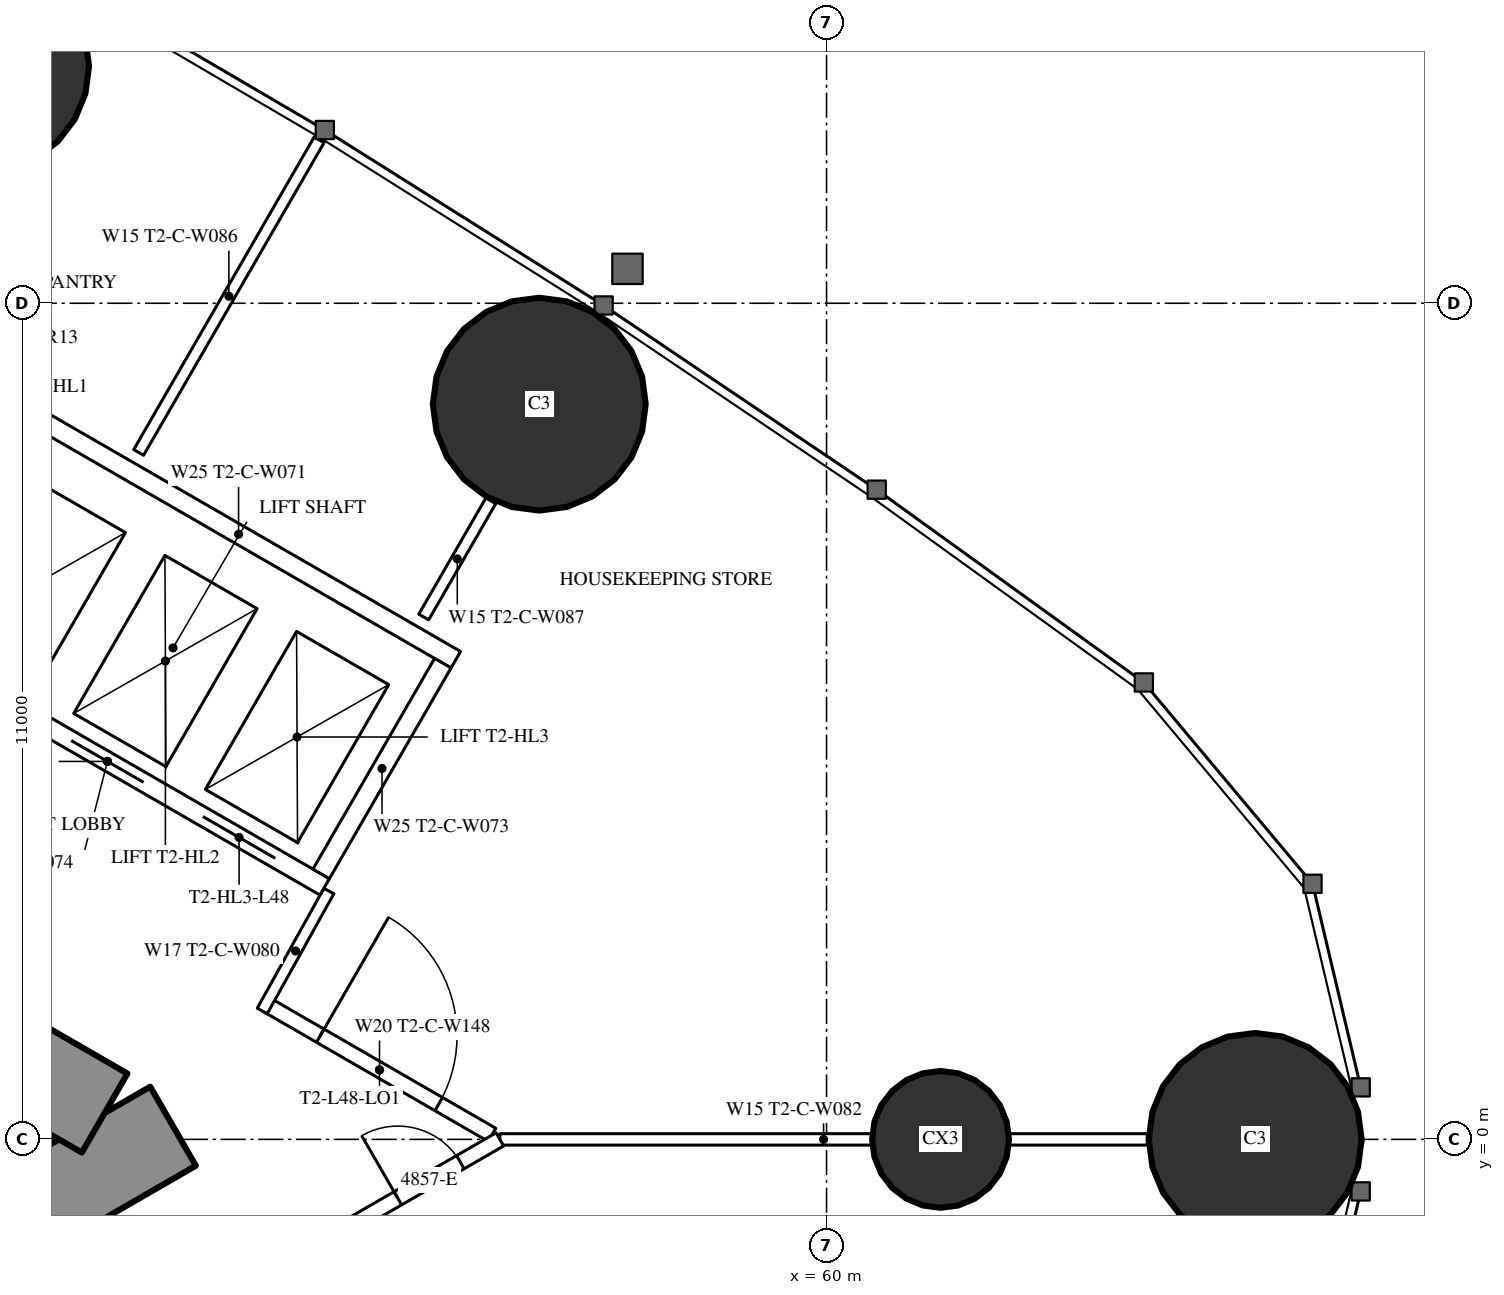
"""IFC4 building model, lengths in metres.
Left out: names, types, materials, properties, quantities, classifications, styles, units other than length and angle.
Written with IfcOpenShell. Run it as: python <this file> out.ifc"""

import sys

from ifc_helpers import new_model, si_unit, direction, frame, frame_2d, origin, origin_2d, place, context, subcontext, project, spatial, rectangle, circle, extrude, element, fill, save


model = new_model("IFC4")
c1 = context("Model", 3, precision=1e-05, world=origin(), true_north=direction((0.0, 1.0)))
c2 = subcontext(c1, "Body", "Model", "MODEL_VIEW")
j1 = project(units=[si_unit("LENGTHUNIT", "METRE"), si_unit("PLANEANGLEUNIT", "RADIAN")], contexts=[c1])
p1 = place(None, origin())
s1 = spatial("IfcSite", under=j1, at=p1, CompositionType="ELEMENT")
p2 = place(p1, origin())
s2 = spatial("IfcBuilding", under=s1, at=p2, CompositionType="ELEMENT")
p3 = place(p2, frame((0.0, 0.0, 180.8)))
s3 = spatial("IfcBuildingStorey", under=s2, at=p3, CompositionType="ELEMENT", Elevation=180.8)
for number, where, z_axis, x_axis in (
    (1, (65.64, 0.0, 0.0), (0.0, 0.0, 1.0), (1.0, 0.0, 0.0)),
    (2, (56.221, 9.672, 0.0), (0.0, 0.0, 1.0), (1.0, 0.0, 0.0)),
    (3, (48.897, 14.121, 0.0), (0.0, 0.0, 1.0), (1.0, 0.0, 0.0)),
):
    element("IfcColumn", number, at=place(p3, frame(where, z_axis=z_axis, x_axis=x_axis)), inside=s3, PredefinedType="COLUMN", context=c2, shape_type="SweptSolid", body=[
        extrude(circle(Radius=1.4, at=origin_2d()), origin(), (0.0, 0.0, 1.0), 3.5),
    ])
p4 = place(p3, frame((61.5, 0.0, 0.0), z_axis=(0.0, 0.0, 1.0), x_axis=(1.0, 0.0, 0.0)))
e4 = element("IfcColumn", 4, at=p4, inside=s3, PredefinedType="COLUMN", context=c2, shape_type="SweptSolid", body=[
    extrude(circle(Radius=0.9, at=origin_2d()), origin(), (0.0, 0.0, 1.0), 3.5),
])
p5 = place(p3, frame((27.2, -13.8, 0.0), z_axis=(0.0, 0.0, 1.0), x_axis=(0.866027159892, 0.499996958321, 0.0)))
e5 = element("IfcWall", 5, at=p5, inside=s3, PredefinedType="SHEAR", context=c2, shape_type="SweptSolid", body=[
    extrude(rectangle(XDim=27.947, YDim=1.2, at=frame_2d((13.973, 0.0))), origin(), (0.0, 0.0, 1.0), 3.5),
])
p6 = place(p5, frame((4.6, 0.0, 0.0)))
e6 = element("IfcOpeningElement", 6, at=p6, cuts=e5, PredefinedType="OPENING", context=c2, shape_type="SweptSolid", body=[
    extrude(rectangle(XDim=1.0, YDim=2.2, at=frame_2d((0.5, 1.1))), frame((0.0, 0.61, 0.0), z_axis=(0.0, -1.0, 0.0), x_axis=(1.0, 0.0, 0.0)), (0.0, 0.0, 1.0), 1.22),
])
p7 = place(p5, frame((13.395, 0.0, 0.0)))
e7 = element("IfcOpeningElement", 7, at=p7, cuts=e5, PredefinedType="OPENING", context=c2, shape_type="SweptSolid", body=[
    extrude(rectangle(XDim=1.8, YDim=2.2, at=frame_2d((0.9, 1.1))), frame((0.0, 0.61, 0.0), z_axis=(0.0, -1.0, 0.0), x_axis=(1.0, 0.0, 0.0)), (0.0, 0.0, 1.0), 1.22),
])
p8 = place(p3, frame((27.2, 13.8, 0.0), z_axis=(0.0, 0.0, 1.0), x_axis=(0.866024515034, -0.500001539357, 0.0)))
e8 = element("IfcWall", 8, at=p8, inside=s3, PredefinedType="SHEAR", context=c2, shape_type="SweptSolid", body=[
    extrude(rectangle(XDim=26.907, YDim=1.2, at=frame_2d((13.454, 0.0))), origin(), (0.0, 0.0, 1.0), 3.5),
])
p9 = place(p8, frame((4.6, 0.0, 0.0)))
e9 = element("IfcOpeningElement", 9, at=p9, cuts=e8, PredefinedType="OPENING", context=c2, shape_type="SweptSolid", body=[
    extrude(rectangle(XDim=1.0, YDim=2.2, at=frame_2d((0.5, 1.1))), frame((0.0, 0.61, 0.0), z_axis=(0.0, -1.0, 0.0), x_axis=(1.0, 0.0, 0.0)), (0.0, 0.0, 1.0), 1.22),
])
p10 = place(p8, frame((13.395, 0.0, 0.0)))
e10 = element("IfcOpeningElement", 10, at=p10, cuts=e8, PredefinedType="OPENING", context=c2, shape_type="SweptSolid", body=[
    extrude(rectangle(XDim=1.8, YDim=2.2, at=frame_2d((0.9, 1.1))), frame((0.0, 0.61, 0.0), z_axis=(0.0, -1.0, 0.0), x_axis=(1.0, 0.0, 0.0)), (0.0, 0.0, 1.0), 1.22),
])
p11 = place(p3, frame((55.702, 0.0, 0.0), z_axis=(0.0, 0.0, 1.0), x_axis=(1.0, 0.0, 0.0)))
e11 = element("IfcWall", 11, at=p11, inside=s3, PredefinedType="PARTITIONING", context=c2, shape_type="SweptSolid", body=[
    extrude(rectangle(XDim=8.518, YDim=0.15, at=frame_2d((4.259, 0.0))), origin(), (0.0, 0.0, 1.0), 2.3),
])
p12 = place(p3, frame((50.95, 9.037, 0.0), z_axis=(0.0, 0.0, 1.0), x_axis=(0.499988022762, 0.866032318735, 0.0)))
e12 = element("IfcWall", 12, at=p12, inside=s3, PredefinedType="PARTITIONING", context=c2, shape_type="SweptSolid", body=[
    extrude(rectangle(XDim=4.748, YDim=0.15, at=frame_2d((2.374, 0.0))), origin(), (0.0, 0.0, 1.0), 3.25),
])
p13 = place(p3, frame((54.7, 6.872, 0.0), z_axis=(0.0, 0.0, 1.0), x_axis=(0.499989690894, 0.866031355668, 0.0)))
e13 = element("IfcWall", 13, at=p13, inside=s3, PredefinedType="PARTITIONING", context=c2, shape_type="SweptSolid", body=[
    extrude(rectangle(XDim=1.766, YDim=0.15, at=frame_2d((0.883, 0.0))), origin(), (0.0, 0.0, 1.0), 3.25),
])
p14 = place(p3, frame((52.639, 1.769, 0.0), z_axis=(0.0, 0.0, 1.0), x_axis=(0.866027340901, -0.4999966448, 0.0)))
e14 = element("IfcWall", 14, at=p14, inside=s3, PredefinedType="PARTITIONING", context=c2, shape_type="SweptSolid", body=[
    extrude(rectangle(XDim=3.417, YDim=0.2, at=frame_2d((1.708, 0.0))), origin(), (0.0, 0.0, 1.0), 3.25),
])
p15 = place(p14, frame((0.809, 0.0, 0.0)))
e15 = element("IfcOpeningElement", 15, at=p15, cuts=e14, PredefinedType="OPENING", context=c2, shape_type="SweptSolid", body=[
    extrude(rectangle(XDim=1.8, YDim=2.2, at=frame_2d((0.9, 1.1))), frame((0.0, 0.11, 0.0), z_axis=(0.0, -1.0, 0.0), x_axis=(1.0, 0.0, 0.0)), (0.0, 0.0, 1.0), 0.22),
])
p16 = place(p3, frame((52.576, 1.689, 0.0), z_axis=(0.0, 0.0, 1.0), x_axis=(0.485482130951, 0.874246590229, 0.0)))
e16 = element("IfcWall", 16, at=p16, inside=s3, PredefinedType="PARTITIONING", context=c2, shape_type="SweptSolid", body=[
    extrude(rectangle(XDim=1.805, YDim=0.15, at=frame_2d((0.902, 0.0))), origin(), (0.0, 0.0, 1.0), 3.25),
])
p17 = place(p3, frame((51.997, -2.139, 0.0), z_axis=(0.0, 0.0, 1.0), x_axis=(0.866036399848, 0.499980953776, 0.0)))
e17 = element("IfcWall", 17, at=p17, inside=s3, PredefinedType="PARTITIONING", context=c2, shape_type="SweptSolid", body=[
    extrude(rectangle(XDim=4.279, YDim=0.2, at=frame_2d((2.139, 0.0))), origin(), (0.0, 0.0, 1.0), 3.25),
])
p18 = place(p17, frame((2.729, 0.0, 0.0)))
e18 = element("IfcOpeningElement", 18, at=p18, cuts=e17, PredefinedType="OPENING", context=c2, shape_type="SweptSolid", body=[
    extrude(rectangle(XDim=0.95, YDim=2.2, at=frame_2d((0.475, 1.1))), frame((0.0, 0.11, 0.0), z_axis=(0.0, -1.0, 0.0), x_axis=(1.0, 0.0, 0.0)), (0.0, 0.0, 1.0), 0.22),
])
p19 = place(p3, frame((47.681, 6.622, 0.0), z_axis=(0.0, 0.0, 1.0), x_axis=(0.86603344179, -0.499986077507, 0.0)))
e19 = element("IfcWall", 19, at=p19, inside=s3, PredefinedType="PARTITIONING", context=c2, shape_type="SweptSolid", body=[
    extrude(rectangle(XDim=6.6, YDim=0.25, at=frame_2d((3.3, 0.0))), origin(), (0.0, 0.0, 1.0), 3.25),
])
p20 = place(p19, frame((0.75, 0.0, 0.0)))
e20 = element("IfcOpeningElement", 20, at=p20, cuts=e19, PredefinedType="OPENING", context=c2, shape_type="SweptSolid", body=[
    extrude(rectangle(XDim=1.1, YDim=2.2, at=frame_2d((0.55, 1.1))), frame((0.0, 0.135, 0.0), z_axis=(0.0, -1.0, 0.0), x_axis=(1.0, 0.0, 0.0)), (0.0, 0.0, 1.0), 0.27),
])
p21 = place(p19, frame((2.75, 0.0, 0.0)))
e21 = element("IfcOpeningElement", 21, at=p21, cuts=e19, PredefinedType="OPENING", context=c2, shape_type="SweptSolid", body=[
    extrude(rectangle(XDim=1.1, YDim=2.2, at=frame_2d((0.55, 1.1))), frame((0.0, 0.135, 0.0), z_axis=(0.0, -1.0, 0.0), x_axis=(1.0, 0.0, 0.0)), (0.0, 0.0, 1.0), 0.27),
])
p22 = place(p19, frame((4.75, 0.0, 0.0)))
e22 = element("IfcOpeningElement", 22, at=p22, cuts=e19, PredefinedType="OPENING", context=c2, shape_type="SweptSolid", body=[
    extrude(rectangle(XDim=1.1, YDim=2.2, at=frame_2d((0.55, 1.1))), frame((0.0, 0.135, 0.0), z_axis=(0.0, -1.0, 0.0), x_axis=(1.0, 0.0, 0.0)), (0.0, 0.0, 1.0), 0.27),
])
p23 = place(p3, frame((49.406, 9.611, 0.0), z_axis=(0.0, 0.0, 1.0), x_axis=(0.86603344179, -0.499986077507, 0.0)))
e23 = element("IfcWall", 23, at=p23, inside=s3, PredefinedType="PARTITIONING", context=c2, shape_type="SweptSolid", body=[
    extrude(rectangle(XDim=6.6, YDim=0.25, at=frame_2d((3.3, 0.0))), origin(), (0.0, 0.0, 1.0), 3.25),
])
p24 = place(p3, frame((53.352, 3.493, 0.0), z_axis=(0.0, 0.0, 1.0), x_axis=(0.499872130319, 0.866099216793, 0.0)))
e24 = element("IfcWall", 24, at=p24, inside=s3, PredefinedType="PARTITIONING", context=c2, shape_type="SweptSolid", body=[
    extrude(rectangle(XDim=3.2, YDim=0.25, at=frame_2d((1.6, 0.0))), origin(), (0.0, 0.0, 1.0), 3.25),
])
p25 = place(p18, origin())
e25 = element("IfcDoor", 25, at=p25, inside=s3, OperationType="SINGLE_SWING_LEFT", PredefinedType="DOOR", context=c2, shape_type="SweptSolid", body=[
    extrude(rectangle(XDim=0.95, YDim=2.2, at=frame_2d((0.475, 1.1))), frame((0.0, 0.025, 0.0), z_axis=(0.0, -1.0, 0.0), x_axis=(1.0, 0.0, 0.0)), (0.0, 0.0, 1.0), 0.05),
])
fill(e18, e25)
p26 = place(p15, origin())
e26 = element("IfcDoor", 26, at=p26, inside=s3, OperationType="DOUBLE_DOOR_SINGLE_SWING", PredefinedType="DOOR", context=c2, shape_type="SweptSolid", body=[
    extrude(rectangle(XDim=1.8, YDim=2.2, at=frame_2d((0.9, 1.1))), frame((0.0, 0.025, 0.0), z_axis=(0.0, -1.0, 0.0), x_axis=(1.0, 0.0, 0.0)), (0.0, 0.0, 1.0), 0.05),
])
fill(e15, e26)
p27 = place(p21, origin())
e27 = element("IfcDoor", 27, at=p27, inside=s3, OperationType="DOUBLE_DOOR_SLIDING", PredefinedType="USERDEFINED", context=c2, shape_type="SweptSolid", body=[
    extrude(rectangle(XDim=1.1, YDim=2.2, at=frame_2d((0.55, 1.1))), frame((0.0, 0.025, 0.0), z_axis=(0.0, -1.0, 0.0), x_axis=(1.0, 0.0, 0.0)), (0.0, 0.0, 1.0), 0.05),
])
fill(e21, e27)
p28 = place(p22, origin())
e28 = element("IfcDoor", 28, at=p28, inside=s3, OperationType="DOUBLE_DOOR_SLIDING", PredefinedType="USERDEFINED", context=c2, shape_type="SweptSolid", body=[
    extrude(rectangle(XDim=1.1, YDim=2.2, at=frame_2d((0.55, 1.1))), frame((0.0, 0.025, 0.0), z_axis=(0.0, -1.0, 0.0), x_axis=(1.0, 0.0, 0.0)), (0.0, 0.0, 1.0), 0.05),
])
fill(e22, e28)
save(model, sys.argv[1])
